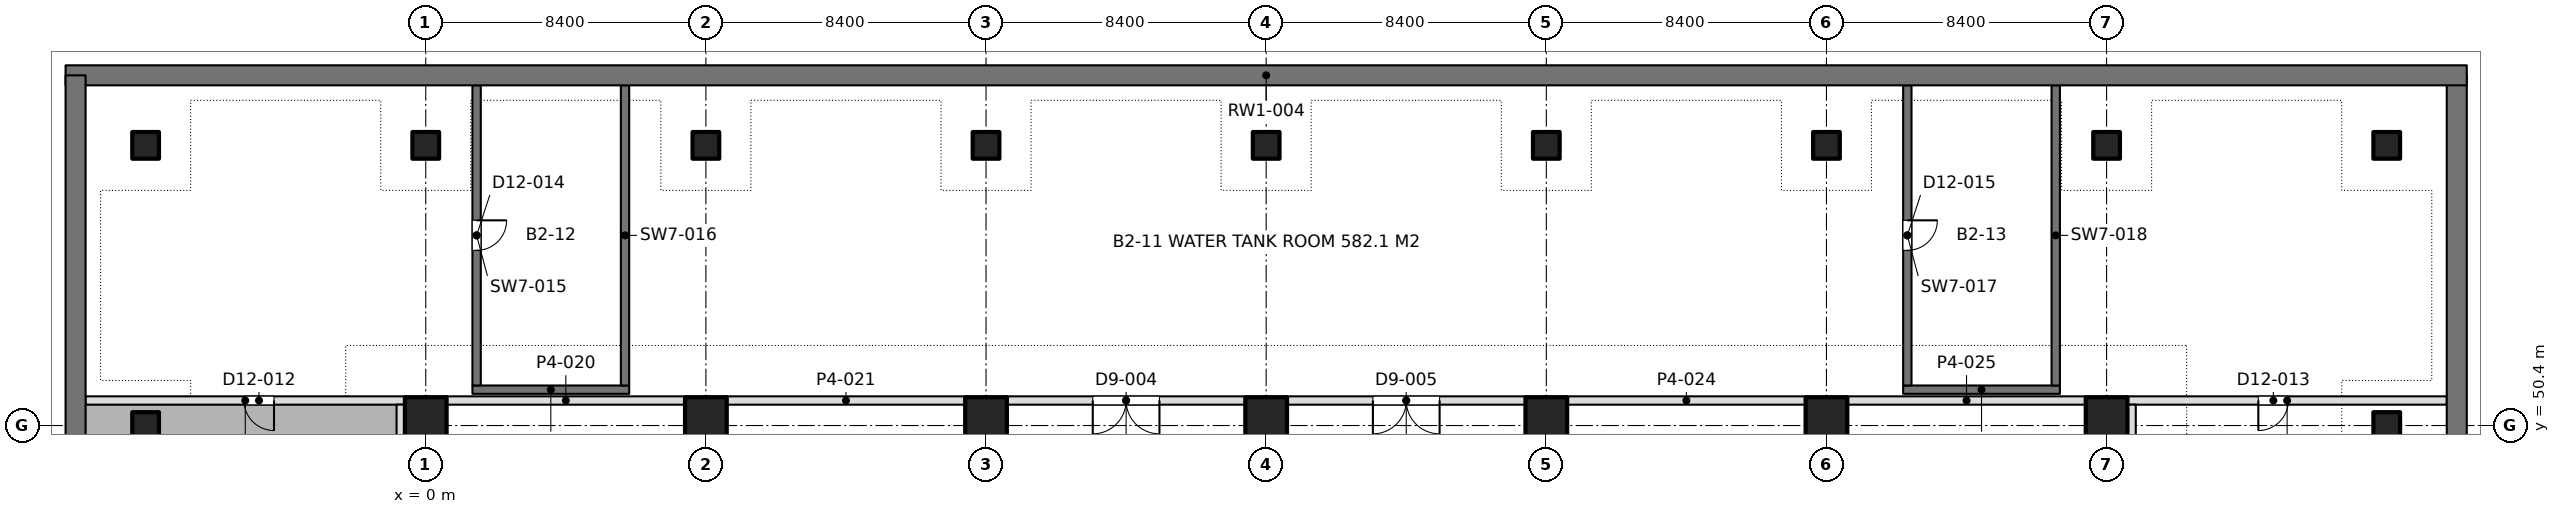
"""IFC4 building model, lengths in metres.
Left out: names, types, materials, properties, quantities, classifications, styles, units other than length and angle.
Written with IfcOpenShell. Run it as: python <this file> out.ifc"""

import sys

from ifc_helpers import new_model, si_unit, direction, frame, frame_2d, origin, origin_2d, place, context, subcontext, project, spatial, rectangle, extrude, element, fill, save


model = new_model("IFC4")
c1 = context("Model", 3, precision=1e-05, world=origin(), true_north=direction((0.0, 1.0)))
c2 = subcontext(c1, "Body", "Model", "MODEL_VIEW")
j1 = project(units=[si_unit("LENGTHUNIT", "METRE"), si_unit("PLANEANGLEUNIT", "RADIAN")], contexts=[c1])
p1 = place(None, origin())
s1 = spatial("IfcSite", under=j1, at=p1, CompositionType="ELEMENT")
p2 = place(p1, origin())
s2 = spatial("IfcBuilding", under=s1, at=p2, CompositionType="ELEMENT")
p3 = place(p2, frame((0.0, 0.0, -8.4)))
s3 = spatial("IfcBuildingStorey", under=s2, at=p3, CompositionType="ELEMENT", Elevation=-8.4)
p4 = place(p3, frame((-10.8, 60.9, 0.0), z_axis=(0.0, 0.0, 1.0), x_axis=(1.0, 0.0, 0.0)))
e1 = element("IfcWall", 1, at=p4, inside=s3, PredefinedType="SOLIDWALL", context=c2, shape_type="SweptSolid", body=[
    extrude(rectangle(XDim=72.0, YDim=0.6, at=frame_2d((36.0, 0.0))), origin(), (0.0, 0.0, 1.0), 4.2),
])
for number, where, z_axis, x_axis in (
    (2, (-10.5, -10.5, 0.0), (0.0, 0.0, 1.0), (0.0, 1.0, 0.0)),
    (3, (60.9, -10.5, 0.0), (0.0, 0.0, 1.0), (0.0, 1.0, 0.0)),
):
    element("IfcWall", number, at=place(p3, frame(where, z_axis=z_axis, x_axis=x_axis)), inside=s3, PredefinedType="SOLIDWALL", context=c2, shape_type="SweptSolid", body=[
        extrude(rectangle(XDim=71.4, YDim=0.6, at=frame_2d((35.7, 0.0))), origin(), (0.0, 0.0, 1.0), 4.2),
    ])
for number, where, z_axis, x_axis in (
    (4, (-8.4, 50.4, 0.0), (0.0, 0.0, 1.0), (1.0, 0.0, 0.0)),
    (5, (-8.4, 58.8, 0.0), (0.0, 0.0, 1.0), (1.0, 0.0, 0.0)),
):
    element("IfcColumn", number, at=place(p3, frame(where, z_axis=z_axis, x_axis=x_axis)), inside=s3, PredefinedType="COLUMN", context=c2, shape_type="SweptSolid", body=[
        extrude(rectangle(XDim=0.8, YDim=0.8, at=origin_2d()), origin(), (0.0, 0.0, 1.0), 4.2),
    ])
p5 = place(p3, frame((0.0, 50.4, 0.0), z_axis=(0.0, 0.0, 1.0), x_axis=(1.0, 0.0, 0.0)))
e6 = element("IfcColumn", 6, at=p5, inside=s3, PredefinedType="COLUMN", context=c2, shape_type="SweptSolid", body=[
    extrude(rectangle(XDim=1.25, YDim=1.7, at=origin_2d()), origin(), (0.0, 0.0, 1.0), 4.2),
])
p6 = place(p3, frame((0.0, 58.8, 0.0), z_axis=(0.0, 0.0, 1.0), x_axis=(1.0, 0.0, 0.0)))
e7 = element("IfcColumn", 7, at=p6, inside=s3, PredefinedType="COLUMN", context=c2, shape_type="SweptSolid", body=[
    extrude(rectangle(XDim=0.8, YDim=0.8, at=origin_2d()), origin(), (0.0, 0.0, 1.0), 4.2),
])
p7 = place(p3, frame((8.4, 50.4, 0.0), z_axis=(0.0, 0.0, 1.0), x_axis=(1.0, 0.0, 0.0)))
e8 = element("IfcColumn", 8, at=p7, inside=s3, PredefinedType="COLUMN", context=c2, shape_type="SweptSolid", body=[
    extrude(rectangle(XDim=1.25, YDim=1.7, at=origin_2d()), origin(), (0.0, 0.0, 1.0), 4.2),
])
p8 = place(p3, frame((8.4, 58.8, 0.0), z_axis=(0.0, 0.0, 1.0), x_axis=(1.0, 0.0, 0.0)))
e9 = element("IfcColumn", 9, at=p8, inside=s3, PredefinedType="COLUMN", context=c2, shape_type="SweptSolid", body=[
    extrude(rectangle(XDim=0.8, YDim=0.8, at=origin_2d()), origin(), (0.0, 0.0, 1.0), 4.2),
])
p9 = place(p3, frame((16.8, 50.4, 0.0), z_axis=(0.0, 0.0, 1.0), x_axis=(1.0, 0.0, 0.0)))
e10 = element("IfcColumn", 10, at=p9, inside=s3, PredefinedType="COLUMN", context=c2, shape_type="SweptSolid", body=[
    extrude(rectangle(XDim=1.25, YDim=1.7, at=origin_2d()), origin(), (0.0, 0.0, 1.0), 4.2),
])
p10 = place(p3, frame((16.8, 58.8, 0.0), z_axis=(0.0, 0.0, 1.0), x_axis=(1.0, 0.0, 0.0)))
e11 = element("IfcColumn", 11, at=p10, inside=s3, PredefinedType="COLUMN", context=c2, shape_type="SweptSolid", body=[
    extrude(rectangle(XDim=0.8, YDim=0.8, at=origin_2d()), origin(), (0.0, 0.0, 1.0), 4.2),
])
p11 = place(p3, frame((25.2, 50.4, 0.0), z_axis=(0.0, 0.0, 1.0), x_axis=(1.0, 0.0, 0.0)))
e12 = element("IfcColumn", 12, at=p11, inside=s3, PredefinedType="COLUMN", context=c2, shape_type="SweptSolid", body=[
    extrude(rectangle(XDim=1.25, YDim=1.7, at=origin_2d()), origin(), (0.0, 0.0, 1.0), 4.2),
])
p12 = place(p3, frame((25.2, 58.8, 0.0), z_axis=(0.0, 0.0, 1.0), x_axis=(1.0, 0.0, 0.0)))
e13 = element("IfcColumn", 13, at=p12, inside=s3, PredefinedType="COLUMN", context=c2, shape_type="SweptSolid", body=[
    extrude(rectangle(XDim=0.8, YDim=0.8, at=origin_2d()), origin(), (0.0, 0.0, 1.0), 4.2),
])
p13 = place(p3, frame((33.6, 50.4, 0.0), z_axis=(0.0, 0.0, 1.0), x_axis=(1.0, 0.0, 0.0)))
e14 = element("IfcColumn", 14, at=p13, inside=s3, PredefinedType="COLUMN", context=c2, shape_type="SweptSolid", body=[
    extrude(rectangle(XDim=1.25, YDim=1.7, at=origin_2d()), origin(), (0.0, 0.0, 1.0), 4.2),
])
p14 = place(p3, frame((33.6, 58.8, 0.0), z_axis=(0.0, 0.0, 1.0), x_axis=(1.0, 0.0, 0.0)))
e15 = element("IfcColumn", 15, at=p14, inside=s3, PredefinedType="COLUMN", context=c2, shape_type="SweptSolid", body=[
    extrude(rectangle(XDim=0.8, YDim=0.8, at=origin_2d()), origin(), (0.0, 0.0, 1.0), 4.2),
])
p15 = place(p3, frame((42.0, 50.4, 0.0), z_axis=(0.0, 0.0, 1.0), x_axis=(1.0, 0.0, 0.0)))
e16 = element("IfcColumn", 16, at=p15, inside=s3, PredefinedType="COLUMN", context=c2, shape_type="SweptSolid", body=[
    extrude(rectangle(XDim=1.25, YDim=1.7, at=origin_2d()), origin(), (0.0, 0.0, 1.0), 4.2),
])
p16 = place(p3, frame((42.0, 58.8, 0.0), z_axis=(0.0, 0.0, 1.0), x_axis=(1.0, 0.0, 0.0)))
e17 = element("IfcColumn", 17, at=p16, inside=s3, PredefinedType="COLUMN", context=c2, shape_type="SweptSolid", body=[
    extrude(rectangle(XDim=0.8, YDim=0.8, at=origin_2d()), origin(), (0.0, 0.0, 1.0), 4.2),
])
p17 = place(p3, frame((50.4, 50.4, 0.0), z_axis=(0.0, 0.0, 1.0), x_axis=(1.0, 0.0, 0.0)))
e18 = element("IfcColumn", 18, at=p17, inside=s3, PredefinedType="COLUMN", context=c2, shape_type="SweptSolid", body=[
    extrude(rectangle(XDim=1.25, YDim=1.7, at=origin_2d()), origin(), (0.0, 0.0, 1.0), 4.2),
])
for number, where, z_axis, x_axis in (
    (19, (50.4, 58.8, 0.0), (0.0, 0.0, 1.0), (1.0, 0.0, 0.0)),
    (20, (58.8, 50.4, 0.0), (0.0, 0.0, 1.0), (1.0, 0.0, 0.0)),
    (21, (58.8, 58.8, 0.0), (0.0, 0.0, 1.0), (1.0, 0.0, 0.0)),
):
    element("IfcColumn", number, at=place(p3, frame(where, z_axis=z_axis, x_axis=x_axis)), inside=s3, PredefinedType="COLUMN", context=c2, shape_type="SweptSolid", body=[
        extrude(rectangle(XDim=0.8, YDim=0.8, at=origin_2d()), origin(), (0.0, 0.0, 1.0), 4.2),
    ])
p18 = place(p3, frame((-10.2, 51.15, 0.0), z_axis=(0.0, 0.0, 1.0), x_axis=(1.0, 0.0, 0.0)))
e22 = element("IfcWall", 22, at=p18, inside=s3, PredefinedType="PARTITIONING", context=c2, shape_type="SweptSolid", body=[
    extrude(rectangle(XDim=9.576, YDim=0.25, at=frame_2d((4.788, 0.0))), origin(), (0.0, 0.0, 1.0), 3.85),
])
p19 = place(p18, frame((4.75, 0.0, 0.0)))
e23 = element("IfcOpeningElement", 23, at=p19, cuts=e22, PredefinedType="OPENING", context=c2, shape_type="SweptSolid", body=[
    extrude(rectangle(XDim=0.9, YDim=2.2, at=frame_2d((0.45, 1.1))), frame((0.0, 0.135, 0.0), z_axis=(0.0, -1.0, 0.0), x_axis=(1.0, 0.0, 0.0)), (0.0, 0.0, 1.0), 0.27),
])
p20 = place(p3, frame((0.624, 51.15, 0.0), z_axis=(0.0, 0.0, 1.0), x_axis=(1.0, 0.0, 0.0)))
e24 = element("IfcWall", 24, at=p20, inside=s3, PredefinedType="PARTITIONING", context=c2, shape_type="SweptSolid", body=[
    extrude(rectangle(XDim=7.152, YDim=0.25, at=frame_2d((3.576, 0.0))), origin(), (0.0, 0.0, 1.0), 3.85),
])
p21 = place(p3, frame((9.024, 51.15, 0.0), z_axis=(0.0, 0.0, 1.0), x_axis=(1.0, 0.0, 0.0)))
e25 = element("IfcWall", 25, at=p21, inside=s3, PredefinedType="PARTITIONING", context=c2, shape_type="SweptSolid", body=[
    extrude(rectangle(XDim=7.152, YDim=0.25, at=frame_2d((3.576, 0.0))), origin(), (0.0, 0.0, 1.0), 3.85),
])
p22 = place(p3, frame((17.424, 51.15, 0.0), z_axis=(0.0, 0.0, 1.0), x_axis=(1.0, 0.0, 0.0)))
e26 = element("IfcWall", 26, at=p22, inside=s3, PredefinedType="PARTITIONING", context=c2, shape_type="SweptSolid", body=[
    extrude(rectangle(XDim=7.152, YDim=0.25, at=frame_2d((3.576, 0.0))), origin(), (0.0, 0.0, 1.0), 3.85),
])
p23 = place(p22, frame((2.576, 0.0, 0.0)))
e27 = element("IfcOpeningElement", 27, at=p23, cuts=e26, PredefinedType="OPENING", context=c2, shape_type="SweptSolid", body=[
    extrude(rectangle(XDim=2.0, YDim=2.4, at=frame_2d((1.0, 1.2))), frame((0.0, 0.135, 0.0), z_axis=(0.0, -1.0, 0.0), x_axis=(1.0, 0.0, 0.0)), (0.0, 0.0, 1.0), 0.27),
])
p24 = place(p3, frame((25.824, 51.15, 0.0), z_axis=(0.0, 0.0, 1.0), x_axis=(1.0, 0.0, 0.0)))
e28 = element("IfcWall", 28, at=p24, inside=s3, PredefinedType="PARTITIONING", context=c2, shape_type="SweptSolid", body=[
    extrude(rectangle(XDim=7.152, YDim=0.25, at=frame_2d((3.576, 0.0))), origin(), (0.0, 0.0, 1.0), 3.85),
])
p25 = place(p24, frame((2.576, 0.0, 0.0)))
e29 = element("IfcOpeningElement", 29, at=p25, cuts=e28, PredefinedType="OPENING", context=c2, shape_type="SweptSolid", body=[
    extrude(rectangle(XDim=2.0, YDim=2.4, at=frame_2d((1.0, 1.2))), frame((0.0, 0.135, 0.0), z_axis=(0.0, -1.0, 0.0), x_axis=(1.0, 0.0, 0.0)), (0.0, 0.0, 1.0), 0.27),
])
for number, where, z_axis, x_axis in (
    (30, (34.224, 51.15, 0.0), (0.0, 0.0, 1.0), (1.0, 0.0, 0.0)),
    (31, (42.624, 51.15, 0.0), (0.0, 0.0, 1.0), (1.0, 0.0, 0.0)),
):
    element("IfcWall", number, at=place(p3, frame(where, z_axis=z_axis, x_axis=x_axis)), inside=s3, PredefinedType="PARTITIONING", context=c2, shape_type="SweptSolid", body=[
        extrude(rectangle(XDim=7.152, YDim=0.25, at=frame_2d((3.576, 0.0))), origin(), (0.0, 0.0, 1.0), 3.85),
    ])
p26 = place(p3, frame((51.024, 51.15, 0.0), z_axis=(0.0, 0.0, 1.0), x_axis=(1.0, 0.0, 0.0)))
e32 = element("IfcWall", 32, at=p26, inside=s3, PredefinedType="PARTITIONING", context=c2, shape_type="SweptSolid", body=[
    extrude(rectangle(XDim=9.578, YDim=0.25, at=frame_2d((4.789, 0.0))), origin(), (0.0, 0.0, 1.0), 3.85),
])
p27 = place(p26, frame((3.926, 0.0, 0.0)))
e33 = element("IfcOpeningElement", 33, at=p27, cuts=e32, PredefinedType="OPENING", context=c2, shape_type="SweptSolid", body=[
    extrude(rectangle(XDim=0.9, YDim=2.2, at=frame_2d((0.45, 1.1))), frame((0.0, 0.135, 0.0), z_axis=(0.0, -1.0, 0.0), x_axis=(1.0, 0.0, 0.0)), (0.0, 0.0, 1.0), 0.27),
])
p28 = place(p3, frame((-0.75, 42.649, 0.0), z_axis=(0.0, 0.0, 1.0), x_axis=(0.0, 1.0, 0.0)))
e34 = element("IfcWall", 34, at=p28, inside=s3, PredefinedType="PARTITIONING", context=c2, shape_type="SweptSolid", body=[
    extrude(rectangle(XDim=8.377, YDim=0.25, at=frame_2d((4.188, 0.0))), origin(), (0.0, 0.0, 1.0), 3.85),
])
p29 = place(p3, frame((51.15, 42.649, 0.0), z_axis=(0.0, 0.0, 1.0), x_axis=(0.0, 1.0, 0.0)))
e35 = element("IfcWall", 35, at=p29, inside=s3, PredefinedType="PARTITIONING", context=c2, shape_type="SweptSolid", body=[
    extrude(rectangle(XDim=8.377, YDim=0.25, at=frame_2d((4.188, 0.0))), origin(), (0.0, 0.0, 1.0), 3.85),
])
p30 = place(p29, frame((3.101, 0.0, 0.0)))
e36 = element("IfcOpeningElement", 36, at=p30, cuts=e35, PredefinedType="OPENING", context=c2, shape_type="SweptSolid", body=[
    extrude(rectangle(XDim=0.9, YDim=2.2, at=frame_2d((0.45, 1.1))), frame((0.0, 0.135, 0.0), z_axis=(0.0, -1.0, 0.0), x_axis=(1.0, 0.0, 0.0)), (0.0, 0.0, 1.0), 0.27),
])
p31 = place(p3, frame((1.525, 60.602, 0.0), z_axis=(0.0, 0.0, 1.0), x_axis=(0.0, -1.0, 0.0)))
e37 = element("IfcWall", 37, at=p31, inside=s3, PredefinedType="SOLIDWALL", context=c2, shape_type="SweptSolid", body=[
    extrude(rectangle(XDim=9.002, YDim=0.25, at=frame_2d((4.501, 0.0))), origin(), (0.0, 0.0, 1.0), 4.2),
])
p32 = place(p31, frame((4.05, 0.0, 0.0)))
e38 = element("IfcOpeningElement", 38, at=p32, cuts=e37, PredefinedType="OPENING", context=c2, shape_type="SweptSolid", body=[
    extrude(rectangle(XDim=0.9, YDim=2.2, at=frame_2d((0.45, 1.1))), frame((0.0, 0.135, 0.0), z_axis=(0.0, -1.0, 0.0), x_axis=(1.0, 0.0, 0.0)), (0.0, 0.0, 1.0), 0.27),
])
p33 = place(p3, frame((5.975, 60.602, 0.0), z_axis=(0.0, 0.0, 1.0), x_axis=(0.0, -1.0, 0.0)))
e39 = element("IfcWall", 39, at=p33, inside=s3, PredefinedType="SOLIDWALL", context=c2, shape_type="SweptSolid", body=[
    extrude(rectangle(XDim=9.002, YDim=0.25, at=frame_2d((4.501, 0.0))), origin(), (0.0, 0.0, 1.0), 4.2),
])
p34 = place(p3, frame((1.4, 51.475, 0.0), z_axis=(0.0, 0.0, 1.0), x_axis=(1.0, 0.0, 0.0)))
e40 = element("IfcWall", 40, at=p34, inside=s3, PredefinedType="SOLIDWALL", context=c2, shape_type="SweptSolid", body=[
    extrude(rectangle(XDim=4.7, YDim=0.25, at=frame_2d((2.35, 0.0))), origin(), (0.0, 0.0, 1.0), 4.2),
])
p35 = place(p3, frame((44.425, 60.602, 0.0), z_axis=(0.0, 0.0, 1.0), x_axis=(0.0, -1.0, 0.0)))
e41 = element("IfcWall", 41, at=p35, inside=s3, PredefinedType="SOLIDWALL", context=c2, shape_type="SweptSolid", body=[
    extrude(rectangle(XDim=9.002, YDim=0.25, at=frame_2d((4.501, 0.0))), origin(), (0.0, 0.0, 1.0), 4.2),
])
p36 = place(p35, frame((4.05, 0.0, 0.0)))
e42 = element("IfcOpeningElement", 42, at=p36, cuts=e41, PredefinedType="OPENING", context=c2, shape_type="SweptSolid", body=[
    extrude(rectangle(XDim=0.9, YDim=2.2, at=frame_2d((0.45, 1.1))), frame((0.0, 0.135, 0.0), z_axis=(0.0, -1.0, 0.0), x_axis=(1.0, 0.0, 0.0)), (0.0, 0.0, 1.0), 0.27),
])
p37 = place(p3, frame((48.875, 60.602, 0.0), z_axis=(0.0, 0.0, 1.0), x_axis=(0.0, -1.0, 0.0)))
e43 = element("IfcWall", 43, at=p37, inside=s3, PredefinedType="SOLIDWALL", context=c2, shape_type="SweptSolid", body=[
    extrude(rectangle(XDim=9.002, YDim=0.25, at=frame_2d((4.501, 0.0))), origin(), (0.0, 0.0, 1.0), 4.2),
])
p38 = place(p3, frame((44.3, 51.475, 0.0), z_axis=(0.0, 0.0, 1.0), x_axis=(1.0, 0.0, 0.0)))
e44 = element("IfcWall", 44, at=p38, inside=s3, PredefinedType="SOLIDWALL", context=c2, shape_type="SweptSolid", body=[
    extrude(rectangle(XDim=4.7, YDim=0.25, at=frame_2d((2.35, 0.0))), origin(), (0.0, 0.0, 1.0), 4.2),
])
p39 = place(p19, frame((0.9, 0.0, 0.0), z_axis=(0.0, 0.0, 1.0), x_axis=(-1.0, 0.0, 0.0)))
e45 = element("IfcDoor", 45, at=p39, inside=s3, OperationType="SINGLE_SWING_LEFT", PredefinedType="DOOR", context=c2, shape_type="SweptSolid", body=[
    extrude(rectangle(XDim=0.9, YDim=2.2, at=frame_2d((0.45, 1.1))), frame((0.0, 0.025, 0.0), z_axis=(0.0, -1.0, 0.0), x_axis=(1.0, 0.0, 0.0)), (0.0, 0.0, 1.0), 0.05),
])
fill(e23, e45)
p40 = place(p23, frame((2.0, 0.0, 0.0), z_axis=(0.0, 0.0, 1.0), x_axis=(-1.0, 0.0, 0.0)))
e46 = element("IfcDoor", 46, at=p40, inside=s3, OperationType="DOUBLE_DOOR_SINGLE_SWING", PredefinedType="DOOR", context=c2, shape_type="SweptSolid", body=[
    extrude(rectangle(XDim=2.0, YDim=2.4, at=frame_2d((1.0, 1.2))), frame((0.0, 0.025, 0.0), z_axis=(0.0, -1.0, 0.0), x_axis=(1.0, 0.0, 0.0)), (0.0, 0.0, 1.0), 0.05),
])
fill(e27, e46)
p41 = place(p25, frame((2.0, 0.0, 0.0), z_axis=(0.0, 0.0, 1.0), x_axis=(-1.0, 0.0, 0.0)))
e47 = element("IfcDoor", 47, at=p41, inside=s3, OperationType="DOUBLE_DOOR_SINGLE_SWING", PredefinedType="DOOR", context=c2, shape_type="SweptSolid", body=[
    extrude(rectangle(XDim=2.0, YDim=2.4, at=frame_2d((1.0, 1.2))), frame((0.0, 0.025, 0.0), z_axis=(0.0, -1.0, 0.0), x_axis=(1.0, 0.0, 0.0)), (0.0, 0.0, 1.0), 0.05),
])
fill(e29, e47)
p42 = place(p27, frame((0.9, 0.0, 0.0), z_axis=(0.0, 0.0, 1.0), x_axis=(-1.0, 0.0, 0.0)))
e48 = element("IfcDoor", 48, at=p42, inside=s3, OperationType="SINGLE_SWING_RIGHT", PredefinedType="DOOR", context=c2, shape_type="SweptSolid", body=[
    extrude(rectangle(XDim=0.9, YDim=2.2, at=frame_2d((0.45, 1.1))), frame((0.0, 0.025, 0.0), z_axis=(0.0, -1.0, 0.0), x_axis=(1.0, 0.0, 0.0)), (0.0, 0.0, 1.0), 0.05),
])
fill(e33, e48)
p43 = place(p32, origin())
e49 = element("IfcDoor", 49, at=p43, inside=s3, OperationType="SINGLE_SWING_LEFT", PredefinedType="DOOR", context=c2, shape_type="SweptSolid", body=[
    extrude(rectangle(XDim=0.9, YDim=2.2, at=frame_2d((0.45, 1.1))), frame((0.0, 0.025, 0.0), z_axis=(0.0, -1.0, 0.0), x_axis=(1.0, 0.0, 0.0)), (0.0, 0.0, 1.0), 0.05),
])
fill(e38, e49)
p44 = place(p36, origin())
e50 = element("IfcDoor", 50, at=p44, inside=s3, OperationType="SINGLE_SWING_LEFT", PredefinedType="DOOR", context=c2, shape_type="SweptSolid", body=[
    extrude(rectangle(XDim=0.9, YDim=2.2, at=frame_2d((0.45, 1.1))), frame((0.0, 0.025, 0.0), z_axis=(0.0, -1.0, 0.0), x_axis=(1.0, 0.0, 0.0)), (0.0, 0.0, 1.0), 0.05),
])
fill(e42, e50)
save(model, sys.argv[1])
